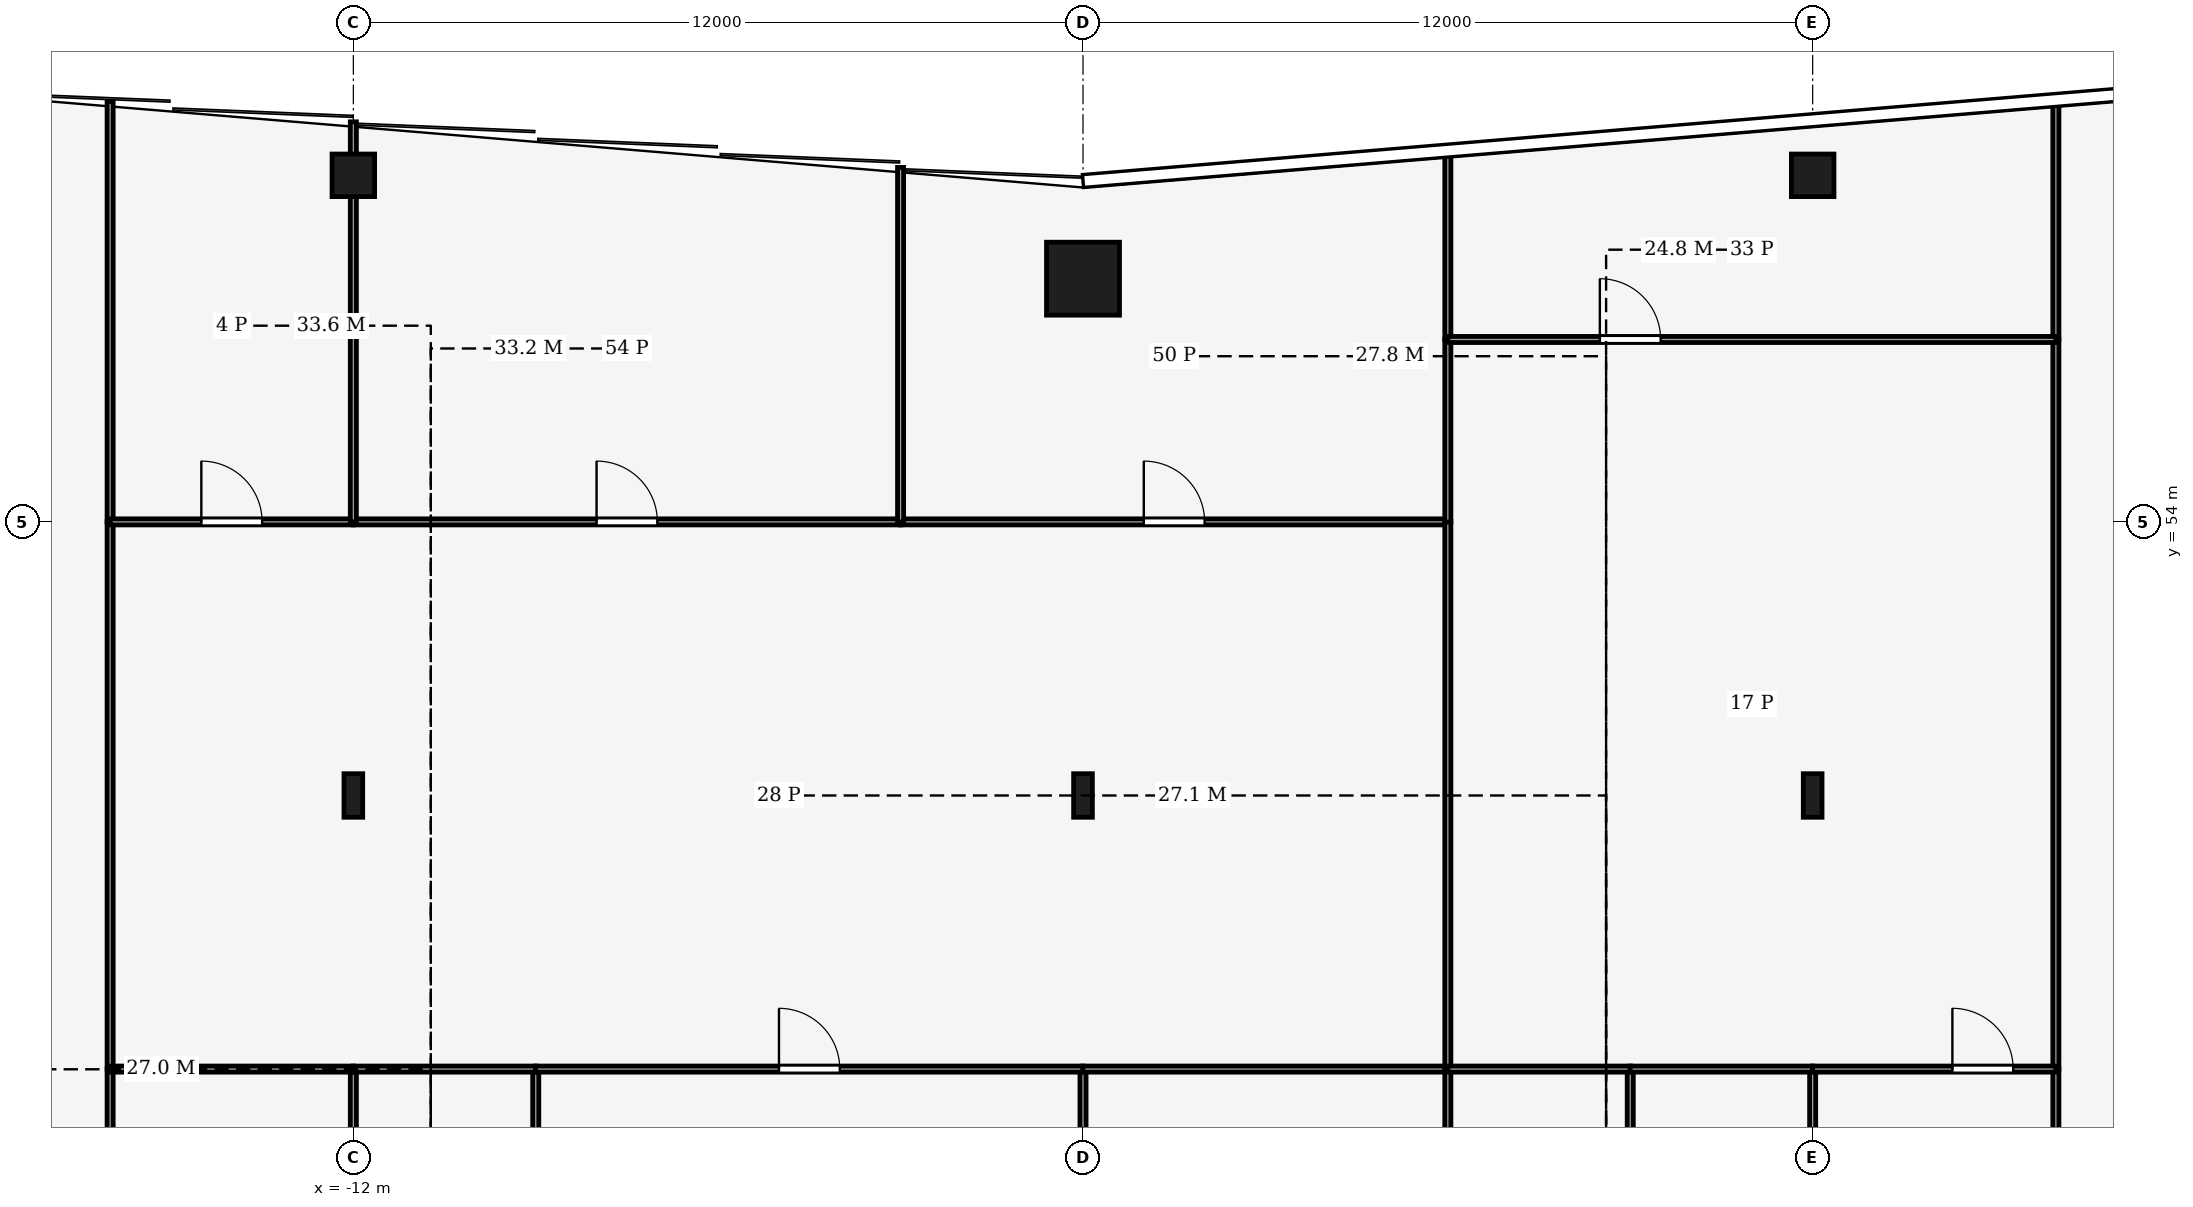
"""IFC4 building model, lengths in metres.
Left out: names, types, materials, properties, quantities, classifications, styles, units other than length and angle.
Written with IfcOpenShell. Run it as: python <this file> out.ifc"""

import sys

from ifc_helpers import new_model, si_unit, direction, frame, frame_2d, origin, origin_2d, place, context, subcontext, project, spatial, rectangle, hollow_rectangle, i_section, extrude, element, fill, save


model = new_model("IFC4")
c1 = context("Model", 3, precision=1e-05, world=origin(), true_north=direction((0.0, 1.0)))
c2 = subcontext(c1, "Body", "Model", "MODEL_VIEW")
j1 = project(units=[si_unit("LENGTHUNIT", "METRE"), si_unit("PLANEANGLEUNIT", "RADIAN")], contexts=[c1])
p1 = place(None, origin())
s1 = spatial("IfcSite", under=j1, at=p1, CompositionType="ELEMENT")
p2 = place(p1, origin())
s2 = spatial("IfcBuilding", under=s1, at=p2, CompositionType="ELEMENT")
p3 = place(p2, frame((0.0, 0.0, 146.0)))
s3 = spatial("IfcBuildingStorey", under=s2, at=p3, CompositionType="ELEMENT", Elevation=146.0)
p4 = place(p3, frame((0.0, 58.0, 0.0), z_axis=(0.0, 0.0, 1.0), x_axis=(1.0, 0.0, 0.0)))
e1 = element("IfcColumn", 1, at=p4, inside=s3, PredefinedType="COLUMN", context=c2, shape_type="SweptSolid", body=[
    extrude(hollow_rectangle(XDim=1.2, YDim=1.2, WallThickness=0.07, at=origin_2d()), origin(), (0.0, 0.0, 1.0), 4.0),
])
for number, where, z_axis, x_axis in (
    (2, (-12.0, 59.7, 0.0), (0.0, 0.0, 1.0), (1.0, 0.0, 0.0)),
    (3, (12.0, 59.7, 0.0), (0.0, 0.0, 1.0), (1.0, 0.0, 0.0)),
):
    element("IfcColumn", number, at=place(p3, frame(where, z_axis=z_axis, x_axis=x_axis)), inside=s3, PredefinedType="COLUMN", context=c2, shape_type="SweptSolid", body=[
        extrude(hollow_rectangle(XDim=0.7, YDim=0.7, WallThickness=0.03, at=origin_2d()), origin(), (0.0, 0.0, 1.0), 4.0),
    ])
for number, where, z_axis, x_axis in (
    (4, (-12.0, 49.5, 0.0), (0.0, 0.0, 1.0), (1.0, 0.0, 0.0)),
    (5, (0.0, 49.5, 0.0), (0.0, 0.0, 1.0), (1.0, 0.0, 0.0)),
    (6, (12.0, 49.5, 0.0), (0.0, 0.0, 1.0), (1.0, 0.0, 0.0)),
):
    element("IfcColumn", number, at=place(p3, frame(where, z_axis=z_axis, x_axis=x_axis)), inside=s3, PredefinedType="COLUMN", context=c2, shape_type="SweptSolid", body=[
        extrude(i_section(OverallWidth=0.308, OverallDepth=0.716, WebThickness=0.021, FlangeThickness=0.04, FilletRadius=0.027, at=origin_2d()), origin(), (0.0, 0.0, 1.0), 4.0),
    ])
p5 = place(p3, frame((-16.0, 41.0, 0.0), z_axis=(0.0, 0.0, 1.0), x_axis=(0.0, 1.0, 0.0)))
e7 = element("IfcWall", 7, at=p5, inside=s3, PredefinedType="PARTITIONING", context=c2, shape_type="SweptSolid", body=[
    extrude(rectangle(XDim=4.0, YDim=0.1, at=frame_2d((2.0, 0.0))), origin(), (0.0, 0.0, 1.0), 3.44),
])
p6 = place(p3, frame((-16.0, 45.0, 0.0), z_axis=(0.0, 0.0, 1.0), x_axis=(0.0, 1.0, 0.0)))
e8 = element("IfcWall", 8, at=p6, inside=s3, PredefinedType="PARTITIONING", context=c2, shape_type="SweptSolid", body=[
    extrude(rectangle(XDim=9.0, YDim=0.1, at=frame_2d((4.5, 0.0))), origin(), (0.0, 0.0, 1.0), 3.24),
])
p7 = place(p3, frame((-16.0, 54.0, 0.0), z_axis=(0.0, 0.0, 1.0), x_axis=(0.0, 1.0, 0.0)))
e9 = element("IfcWall", 9, at=p7, inside=s3, PredefinedType="PARTITIONING", context=c2, shape_type="SweptSolid", body=[
    extrude(rectangle(XDim=6.913, YDim=0.1, at=frame_2d((3.457, 0.0))), origin(), (0.0, 0.0, 1.0), 3.04),
])
p8 = place(p3, frame((16.0, 45.0, 0.0), z_axis=(0.0, 0.0, 1.0), x_axis=(0.0, -1.0, 0.0)))
e10 = element("IfcWall", 10, at=p8, inside=s3, PredefinedType="PARTITIONING", context=c2, shape_type="SweptSolid", body=[
    extrude(rectangle(XDim=4.0, YDim=0.1, at=frame_2d((2.0, 0.0))), origin(), (0.0, 0.0, 1.0), 3.44),
])
p9 = place(p3, frame((16.0, 57.0, 0.0), z_axis=(0.0, 0.0, 1.0), x_axis=(0.0, -1.0, 0.0)))
e11 = element("IfcWall", 11, at=p9, inside=s3, PredefinedType="PARTITIONING", context=c2, shape_type="SweptSolid", body=[
    extrude(rectangle(XDim=12.0, YDim=0.1, at=frame_2d((6.0, 0.0))), origin(), (0.0, 0.0, 1.0), 3.24),
])
p10 = place(p3, frame((16.0, 60.913, 0.0), z_axis=(0.0, 0.0, 1.0), x_axis=(0.0, -1.0, 0.0)))
e12 = element("IfcWall", 12, at=p10, inside=s3, PredefinedType="PARTITIONING", context=c2, shape_type="SweptSolid", body=[
    extrude(rectangle(XDim=3.913, YDim=0.1, at=frame_2d((1.957, 0.0))), origin(), (0.0, 0.0, 1.0), 3.04),
])
p11 = place(p3, frame((-12.0, 41.0, 0.0), z_axis=(0.0, 0.0, 1.0), x_axis=(0.0, 1.0, 0.0)))
e13 = element("IfcWall", 13, at=p11, inside=s3, PredefinedType="PARTITIONING", context=c2, shape_type="SweptSolid", body=[
    extrude(rectangle(XDim=4.0, YDim=0.1, at=frame_2d((2.0, 0.0))), origin(), (0.0, 0.0, 1.0), 3.44),
])
p12 = place(p3, frame((-11.996, 45.0, 0.0), z_axis=(0.0, 0.0, 1.0), x_axis=(-1.0, 0.0, 0.0)))
e14 = element("IfcWall", 14, at=p12, inside=s3, PredefinedType="PARTITIONING", context=c2, shape_type="SweptSolid", body=[
    extrude(rectangle(XDim=4.004, YDim=0.1, at=frame_2d((2.002, 0.0))), origin(), (0.0, 0.0, 1.0), 3.87),
])
p13 = place(p3, frame((-9.0, 41.0, 0.0), z_axis=(0.0, 0.0, 1.0), x_axis=(0.0, 1.0, 0.0)))
e15 = element("IfcWall", 15, at=p13, inside=s3, PredefinedType="PARTITIONING", context=c2, shape_type="SweptSolid", body=[
    extrude(rectangle(XDim=4.0, YDim=0.1, at=frame_2d((2.0, 0.0))), origin(), (0.0, 0.0, 1.0), 3.87),
])
p14 = place(p13, frame((1.5, 0.0, 0.0)))
e16 = element("IfcOpeningElement", 16, at=p14, cuts=e15, PredefinedType="OPENING", context=c2, shape_type="SweptSolid", body=[
    extrude(rectangle(XDim=1.0, YDim=2.1, at=frame_2d((0.5, 1.05))), frame((0.0, 0.06, 0.0), z_axis=(0.0, -1.0, 0.0), x_axis=(1.0, 0.0, 0.0)), (0.0, 0.0, 1.0), 0.12),
])
p15 = place(p3, frame((-8.996, 45.0, 0.0), z_axis=(0.0, 0.0, 1.0), x_axis=(-1.0, 0.0, 0.0)))
e17 = element("IfcWall", 17, at=p15, inside=s3, PredefinedType="PARTITIONING", context=c2, shape_type="SweptSolid", body=[
    extrude(rectangle(XDim=3.008, YDim=0.1, at=frame_2d((1.504, 0.0))), origin(), (0.0, 0.0, 1.0), 3.87),
])
p16 = place(p3, frame((0.0, 41.0, 0.0), z_axis=(0.0, 0.0, 1.0), x_axis=(0.0, 1.0, 0.0)))
e18 = element("IfcWall", 18, at=p16, inside=s3, PredefinedType="PARTITIONING", context=c2, shape_type="SweptSolid", body=[
    extrude(rectangle(XDim=4.0, YDim=0.1, at=frame_2d((2.0, 0.0))), origin(), (0.0, 0.0, 1.0), 3.44),
])
p17 = place(p3, frame((-9.004, 45.0, 0.0), z_axis=(0.0, 0.0, 1.0), x_axis=(1.0, 0.0, 0.0)))
e19 = element("IfcWall", 19, at=p17, inside=s3, PredefinedType="PARTITIONING", context=c2, shape_type="SweptSolid", body=[
    extrude(rectangle(XDim=9.008, YDim=0.1, at=frame_2d((4.504, 0.0))), origin(), (0.0, 0.0, 1.0), 3.44),
])
p18 = place(p17, frame((4.004, 0.0, 0.0)))
e20 = element("IfcOpeningElement", 20, at=p18, cuts=e19, PredefinedType="OPENING", context=c2, shape_type="SweptSolid", body=[
    extrude(rectangle(XDim=1.0, YDim=2.1, at=frame_2d((0.5, 1.05))), frame((0.0, 0.06, 0.0), z_axis=(0.0, -1.0, 0.0), x_axis=(1.0, 0.0, 0.0)), (0.0, 0.0, 1.0), 0.12),
])
p19 = place(p3, frame((6.0, 45.0, 0.0), z_axis=(0.0, 0.0, 1.0), x_axis=(-1.0, 0.0, 0.0)))
e21 = element("IfcWall", 21, at=p19, inside=s3, PredefinedType="PARTITIONING", context=c2, shape_type="SweptSolid", body=[
    extrude(rectangle(XDim=6.004, YDim=0.1, at=frame_2d((3.002, 0.0))), origin(), (0.0, 0.0, 1.0), 3.44),
])
p20 = place(p3, frame((6.0, 41.0, 0.0), z_axis=(0.0, 0.0, 1.0), x_axis=(0.0, 1.0, 0.0)))
e22 = element("IfcWall", 22, at=p20, inside=s3, PredefinedType="PARTITIONING", context=c2, shape_type="SweptSolid", body=[
    extrude(rectangle(XDim=4.0, YDim=0.1, at=frame_2d((2.0, 0.0))), origin(), (0.0, 0.0, 1.0), 3.87),
])
p21 = place(p3, frame((-16.0, 54.0, 0.0), z_axis=(0.0, 0.0, 1.0), x_axis=(1.0, 0.0, 0.0)))
e23 = element("IfcWall", 23, at=p21, inside=s3, PredefinedType="PARTITIONING", context=c2, shape_type="SweptSolid", body=[
    extrude(rectangle(XDim=4.0, YDim=0.1, at=frame_2d((2.0, 0.0))), origin(), (0.0, 0.0, 1.0), 3.87),
])
p22 = place(p21, frame((1.5, 0.0, 0.0)))
e24 = element("IfcOpeningElement", 24, at=p22, cuts=e23, PredefinedType="OPENING", context=c2, shape_type="SweptSolid", body=[
    extrude(rectangle(XDim=1.0, YDim=2.1, at=frame_2d((0.5, 1.05))), frame((0.0, 0.06, 0.0), z_axis=(0.0, -1.0, 0.0), x_axis=(1.0, 0.0, 0.0)), (0.0, 0.0, 1.0), 0.12),
])
p23 = place(p3, frame((-12.0, 54.0, 0.0), z_axis=(0.0, 0.0, 1.0), x_axis=(1.0, 0.0, 0.0)))
e25 = element("IfcWall", 25, at=p23, inside=s3, PredefinedType="PARTITIONING", context=c2, shape_type="SweptSolid", body=[
    extrude(rectangle(XDim=9.0, YDim=0.1, at=frame_2d((4.5, 0.0))), origin(), (0.0, 0.0, 1.0), 3.44),
])
p24 = place(p23, frame((4.0, 0.0, 0.0)))
e26 = element("IfcOpeningElement", 26, at=p24, cuts=e25, PredefinedType="OPENING", context=c2, shape_type="SweptSolid", body=[
    extrude(rectangle(XDim=1.0, YDim=2.1, at=frame_2d((0.5, 1.05))), frame((0.0, 0.06, 0.0), z_axis=(0.0, -1.0, 0.0), x_axis=(1.0, 0.0, 0.0)), (0.0, 0.0, 1.0), 0.12),
])
p25 = place(p3, frame((-3.0, 54.0, 0.0), z_axis=(0.0, 0.0, 1.0), x_axis=(1.0, 0.0, 0.0)))
e27 = element("IfcWall", 27, at=p25, inside=s3, PredefinedType="PARTITIONING", context=c2, shape_type="SweptSolid", body=[
    extrude(rectangle(XDim=9.0, YDim=0.1, at=frame_2d((4.5, 0.0))), origin(), (0.0, 0.0, 1.0), 3.44),
])
p26 = place(p25, frame((4.0, 0.0, 0.0)))
e28 = element("IfcOpeningElement", 28, at=p26, cuts=e27, PredefinedType="OPENING", context=c2, shape_type="SweptSolid", body=[
    extrude(rectangle(XDim=1.0, YDim=2.1, at=frame_2d((0.5, 1.05))), frame((0.0, 0.06, 0.0), z_axis=(0.0, -1.0, 0.0), x_axis=(1.0, 0.0, 0.0)), (0.0, 0.0, 1.0), 0.12),
])
p27 = place(p3, frame((6.0, 45.0, 0.0), z_axis=(0.0, 0.0, 1.0), x_axis=(0.0, 1.0, 0.0)))
e29 = element("IfcWall", 29, at=p27, inside=s3, PredefinedType="PARTITIONING", context=c2, shape_type="SweptSolid", body=[
    extrude(rectangle(XDim=9.004, YDim=0.1, at=frame_2d((4.502, 0.0))), origin(), (0.0, 0.0, 1.0), 3.24),
])
p28 = place(p3, frame((-12.0, 54.0, 0.0), z_axis=(0.0, 0.0, 1.0), x_axis=(0.0, 1.0, 0.0)))
e30 = element("IfcWall", 30, at=p28, inside=s3, PredefinedType="PARTITIONING", context=c2, shape_type="SweptSolid", body=[
    extrude(rectangle(XDim=6.58, YDim=0.1, at=frame_2d((3.29, 0.0))), origin(), (0.0, 0.0, 1.0), 3.04),
])
p29 = place(p3, frame((-3.0, 54.0, 0.0), z_axis=(0.0, 0.0, 1.0), x_axis=(0.0, 1.0, 0.0)))
e31 = element("IfcWall", 31, at=p29, inside=s3, PredefinedType="PARTITIONING", context=c2, shape_type="SweptSolid", body=[
    extrude(rectangle(XDim=5.83, YDim=0.1, at=frame_2d((2.915, 0.0))), origin(), (0.0, 0.0, 1.0), 3.04),
])
p30 = place(p3, frame((6.0, 53.996, 0.0), z_axis=(0.0, 0.0, 1.0), x_axis=(0.0, 1.0, 0.0)))
e32 = element("IfcWall", 32, at=p30, inside=s3, PredefinedType="PARTITIONING", context=c2, shape_type="SweptSolid", body=[
    extrude(rectangle(XDim=3.004, YDim=0.1, at=frame_2d((1.502, 0.0))), origin(), (0.0, 0.0, 1.0), 3.87),
])
p31 = place(p3, frame((6.0, 57.0, 0.0), z_axis=(0.0, 0.0, 1.0), x_axis=(0.0, 1.0, 0.0)))
e33 = element("IfcWall", 33, at=p31, inside=s3, PredefinedType="PARTITIONING", context=c2, shape_type="SweptSolid", body=[
    extrude(rectangle(XDim=3.08, YDim=0.1, at=frame_2d((1.54, 0.0))), origin(), (0.0, 0.0, 1.0), 3.04),
])
p32 = place(p3, frame((9.0, 41.0, 0.0), z_axis=(0.0, 0.0, 1.0), x_axis=(0.0, 1.0, 0.0)))
e34 = element("IfcWall", 34, at=p32, inside=s3, PredefinedType="PARTITIONING", context=c2, shape_type="SweptSolid", body=[
    extrude(rectangle(XDim=4.0, YDim=0.1, at=frame_2d((2.0, 0.0))), origin(), (0.0, 0.0, 1.0), 3.87),
])
p33 = place(p3, frame((9.004, 45.0, 0.0), z_axis=(0.0, 0.0, 1.0), x_axis=(-1.0, 0.0, 0.0)))
e35 = element("IfcWall", 35, at=p33, inside=s3, PredefinedType="PARTITIONING", context=c2, shape_type="SweptSolid", body=[
    extrude(rectangle(XDim=3.004, YDim=0.1, at=frame_2d((1.502, 0.0))), origin(), (0.0, 0.0, 1.0), 3.44),
])
p34 = place(p3, frame((12.0, 41.0, 0.0), z_axis=(0.0, 0.0, 1.0), x_axis=(0.0, 1.0, 0.0)))
e36 = element("IfcWall", 36, at=p34, inside=s3, PredefinedType="PARTITIONING", context=c2, shape_type="SweptSolid", body=[
    extrude(rectangle(XDim=4.0, YDim=0.1, at=frame_2d((2.0, 0.0))), origin(), (0.0, 0.0, 1.0), 3.44),
])
p35 = place(p34, frame((1.9, 0.0, 0.0)))
e37 = element("IfcOpeningElement", 37, at=p35, cuts=e36, PredefinedType="OPENING", context=c2, shape_type="SweptSolid", body=[
    extrude(rectangle(XDim=1.0, YDim=2.1, at=frame_2d((0.5, 1.05))), frame((0.0, 0.06, 0.0), z_axis=(0.0, -1.0, 0.0), x_axis=(1.0, 0.0, 0.0)), (0.0, 0.0, 1.0), 0.12),
])
p36 = place(p3, frame((12.004, 45.0, 0.0), z_axis=(0.0, 0.0, 1.0), x_axis=(-1.0, 0.0, 0.0)))
e38 = element("IfcWall", 38, at=p36, inside=s3, PredefinedType="PARTITIONING", context=c2, shape_type="SweptSolid", body=[
    extrude(rectangle(XDim=3.008, YDim=0.1, at=frame_2d((1.504, 0.0))), origin(), (0.0, 0.0, 1.0), 3.87),
])
p37 = place(p3, frame((11.996, 45.0, 0.0), z_axis=(0.0, 0.0, 1.0), x_axis=(1.0, 0.0, 0.0)))
e39 = element("IfcWall", 39, at=p37, inside=s3, PredefinedType="PARTITIONING", context=c2, shape_type="SweptSolid", body=[
    extrude(rectangle(XDim=4.004, YDim=0.1, at=frame_2d((2.002, 0.0))), origin(), (0.0, 0.0, 1.0), 3.87),
])
p38 = place(p37, frame((2.302, 0.0, 0.0)))
e40 = element("IfcOpeningElement", 40, at=p38, cuts=e39, PredefinedType="OPENING", context=c2, shape_type="SweptSolid", body=[
    extrude(rectangle(XDim=1.0, YDim=2.1, at=frame_2d((0.5, 1.05))), frame((0.0, 0.06, 0.0), z_axis=(0.0, -1.0, 0.0), x_axis=(1.0, 0.0, 0.0)), (0.0, 0.0, 1.0), 0.12),
])
p39 = place(p3, frame((6.0, 57.0, 0.0), z_axis=(0.0, 0.0, 1.0), x_axis=(1.0, 0.0, 0.0)))
e41 = element("IfcWall", 41, at=p39, inside=s3, PredefinedType="PARTITIONING", context=c2, shape_type="SweptSolid", body=[
    extrude(rectangle(XDim=10.0, YDim=0.1, at=frame_2d((5.0, 0.0))), origin(), (0.0, 0.0, 1.0), 3.44),
])
p40 = place(p39, frame((2.5, 0.0, 0.0)))
e42 = element("IfcOpeningElement", 42, at=p40, cuts=e41, PredefinedType="OPENING", context=c2, shape_type="SweptSolid", body=[
    extrude(rectangle(XDim=1.0, YDim=2.1, at=frame_2d((0.5, 1.05))), frame((0.0, 0.06, 0.0), z_axis=(0.0, -1.0, 0.0), x_axis=(1.0, 0.0, 0.0)), (0.0, 0.0, 1.0), 0.12),
])
p41 = place(p18, origin())
e43 = element("IfcDoor", 43, at=p41, inside=s3, OperationType="SINGLE_SWING_LEFT", PredefinedType="DOOR", context=c2, shape_type="SweptSolid", body=[
    extrude(rectangle(XDim=1.0, YDim=2.1, at=frame_2d((0.5, 1.05))), frame((0.0, 0.025, 0.0), z_axis=(0.0, -1.0, 0.0), x_axis=(1.0, 0.0, 0.0)), (0.0, 0.0, 1.0), 0.05),
])
fill(e20, e43)
p42 = place(p22, origin())
e44 = element("IfcDoor", 44, at=p42, inside=s3, OperationType="SINGLE_SWING_RIGHT", PredefinedType="DOOR", context=c2, shape_type="SweptSolid", body=[
    extrude(rectangle(XDim=1.0, YDim=2.1, at=frame_2d((0.5, 1.05))), frame((0.0, 0.025, 0.0), z_axis=(0.0, -1.0, 0.0), x_axis=(1.0, 0.0, 0.0)), (0.0, 0.0, 1.0), 0.05),
])
fill(e24, e44)
p43 = place(p24, origin())
e45 = element("IfcDoor", 45, at=p43, inside=s3, OperationType="SINGLE_SWING_LEFT", PredefinedType="DOOR", context=c2, shape_type="SweptSolid", body=[
    extrude(rectangle(XDim=1.0, YDim=2.1, at=frame_2d((0.5, 1.05))), frame((0.0, 0.025, 0.0), z_axis=(0.0, -1.0, 0.0), x_axis=(1.0, 0.0, 0.0)), (0.0, 0.0, 1.0), 0.05),
])
fill(e26, e45)
p44 = place(p26, origin())
e46 = element("IfcDoor", 46, at=p44, inside=s3, OperationType="SINGLE_SWING_RIGHT", PredefinedType="DOOR", context=c2, shape_type="SweptSolid", body=[
    extrude(rectangle(XDim=1.0, YDim=2.1, at=frame_2d((0.5, 1.05))), frame((0.0, 0.025, 0.0), z_axis=(0.0, -1.0, 0.0), x_axis=(1.0, 0.0, 0.0)), (0.0, 0.0, 1.0), 0.05),
])
fill(e28, e46)
p45 = place(p38, origin())
e47 = element("IfcDoor", 47, at=p45, inside=s3, OperationType="SINGLE_SWING_RIGHT", PredefinedType="DOOR", context=c2, shape_type="SweptSolid", body=[
    extrude(rectangle(XDim=1.0, YDim=2.1, at=frame_2d((0.5, 1.05))), frame((0.0, 0.025, 0.0), z_axis=(0.0, -1.0, 0.0), x_axis=(1.0, 0.0, 0.0)), (0.0, 0.0, 1.0), 0.05),
])
fill(e40, e47)
p46 = place(p40, origin())
e48 = element("IfcDoor", 48, at=p46, inside=s3, OperationType="SINGLE_SWING_LEFT", PredefinedType="DOOR", context=c2, shape_type="SweptSolid", body=[
    extrude(rectangle(XDim=1.0, YDim=2.1, at=frame_2d((0.5, 1.05))), frame((0.0, 0.025, 0.0), z_axis=(0.0, -1.0, 0.0), x_axis=(1.0, 0.0, 0.0)), (0.0, 0.0, 1.0), 0.05),
])
fill(e42, e48)
save(model, sys.argv[1])
